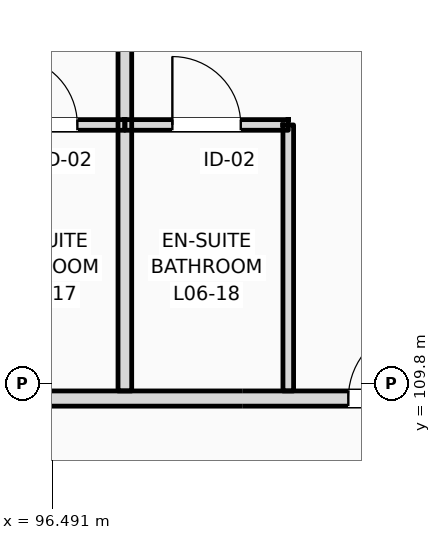
"""IFC4 building model, lengths in metres.
Left out: names, types, materials, properties, quantities, classifications, styles, units other than length and angle.
Written with IfcOpenShell. Run it as: python <this file> out.ifc"""

import sys

from ifc_helpers import new_model, si_unit, direction, frame, frame_2d, origin, place, context, subcontext, project, spatial, rectangle, extrude, element, fill, save


model = new_model("IFC4")
c1 = context("Model", 3, precision=1e-05, world=origin(), true_north=direction((0.0, 1.0)))
c2 = subcontext(c1, "Body", "Model", "MODEL_VIEW")
j1 = project(units=[si_unit("LENGTHUNIT", "METRE"), si_unit("PLANEANGLEUNIT", "RADIAN")], contexts=[c1])
p1 = place(None, origin())
s1 = spatial("IfcSite", under=j1, at=p1, CompositionType="ELEMENT")
p2 = place(p1, origin())
s2 = spatial("IfcBuilding", under=s1, at=p2, CompositionType="ELEMENT")
p3 = place(p2, frame((0.0, 0.0, 28.2)))
s3 = spatial("IfcBuildingStorey", under=s2, at=p3, CompositionType="ELEMENT", Elevation=28.2)
p4 = place(p3, frame((10.65, 109.6, 0.0), z_axis=(0.0, 0.0, 1.0), x_axis=(1.0, 0.0, 0.0)))
e1 = element("IfcWall", 1, at=p4, inside=s3, PredefinedType="PARTITIONING", context=c2, shape_type="SweptSolid", body=[
    extrude(rectangle(XDim=109.21, YDim=0.2, at=frame_2d((54.605, 0.0))), origin(), (0.0, 0.0, 1.0), 2.8),
])
p5 = place(p4, frame((12.611, 0.0, 0.0)))
e2 = element("IfcOpeningElement", 2, at=p5, cuts=e1, PredefinedType="OPENING", context=c2, shape_type="SweptSolid", body=[
    extrude(rectangle(XDim=1.02, YDim=2.2, at=frame_2d((0.51, 1.1))), frame((0.0, 0.11, 0.0), z_axis=(0.0, -1.0, 0.0), x_axis=(1.0, 0.0, 0.0)), (0.0, 0.0, 1.0), 0.22),
])
p6 = place(p4, frame((19.451, 0.0, 0.0)))
e3 = element("IfcOpeningElement", 3, at=p6, cuts=e1, PredefinedType="OPENING", context=c2, shape_type="SweptSolid", body=[
    extrude(rectangle(XDim=1.02, YDim=2.2, at=frame_2d((0.51, 1.1))), frame((0.0, 0.11, 0.0), z_axis=(0.0, -1.0, 0.0), x_axis=(1.0, 0.0, 0.0)), (0.0, 0.0, 1.0), 0.22),
])
p7 = place(p4, frame((23.842, 0.0, 0.0)))
e4 = element("IfcOpeningElement", 4, at=p7, cuts=e1, PredefinedType="OPENING", context=c2, shape_type="SweptSolid", body=[
    extrude(rectangle(XDim=1.02, YDim=2.2, at=frame_2d((0.51, 1.1))), frame((0.0, 0.11, 0.0), z_axis=(0.0, -1.0, 0.0), x_axis=(1.0, 0.0, 0.0)), (0.0, 0.0, 1.0), 0.22),
])
p8 = place(p4, frame((26.084, 0.0, 0.0)))
e5 = element("IfcOpeningElement", 5, at=p8, cuts=e1, PredefinedType="OPENING", context=c2, shape_type="SweptSolid", body=[
    extrude(rectangle(XDim=1.02, YDim=2.2, at=frame_2d((0.51, 1.1))), frame((0.0, 0.11, 0.0), z_axis=(0.0, -1.0, 0.0), x_axis=(1.0, 0.0, 0.0)), (0.0, 0.0, 1.0), 0.22),
])
p9 = place(p4, frame((32.655, 0.0, 0.0)))
e6 = element("IfcOpeningElement", 6, at=p9, cuts=e1, PredefinedType="OPENING", context=c2, shape_type="SweptSolid", body=[
    extrude(rectangle(XDim=0.96, YDim=2.2, at=frame_2d((0.48, 1.1))), frame((0.0, 0.11, 0.0), z_axis=(0.0, -1.0, 0.0), x_axis=(1.0, 0.0, 0.0)), (0.0, 0.0, 1.0), 0.22),
])
p10 = place(p4, frame((34.895, 0.0, 0.0)))
e7 = element("IfcOpeningElement", 7, at=p10, cuts=e1, PredefinedType="OPENING", context=c2, shape_type="SweptSolid", body=[
    extrude(rectangle(XDim=0.96, YDim=2.2, at=frame_2d((0.48, 1.1))), frame((0.0, 0.11, 0.0), z_axis=(0.0, -1.0, 0.0), x_axis=(1.0, 0.0, 0.0)), (0.0, 0.0, 1.0), 0.22),
])
p11 = place(p4, frame((41.436, 0.0, 0.0)))
e8 = element("IfcOpeningElement", 8, at=p11, cuts=e1, PredefinedType="OPENING", context=c2, shape_type="SweptSolid", body=[
    extrude(rectangle(XDim=0.96, YDim=2.2, at=frame_2d((0.48, 1.1))), frame((0.0, 0.11, 0.0), z_axis=(0.0, -1.0, 0.0), x_axis=(1.0, 0.0, 0.0)), (0.0, 0.0, 1.0), 0.22),
])
p12 = place(p4, frame((43.427, 0.0, 0.0)))
e9 = element("IfcOpeningElement", 9, at=p12, cuts=e1, PredefinedType="OPENING", context=c2, shape_type="SweptSolid", body=[
    extrude(rectangle(XDim=0.96, YDim=2.2, at=frame_2d((0.48, 1.1))), frame((0.0, 0.11, 0.0), z_axis=(0.0, -1.0, 0.0), x_axis=(1.0, 0.0, 0.0)), (0.0, 0.0, 1.0), 0.22),
])
p13 = place(p4, frame((50.218, 0.0, 0.0)))
e10 = element("IfcOpeningElement", 10, at=p13, cuts=e1, PredefinedType="OPENING", context=c2, shape_type="SweptSolid", body=[
    extrude(rectangle(XDim=0.96, YDim=2.2, at=frame_2d((0.48, 1.1))), frame((0.0, 0.11, 0.0), z_axis=(0.0, -1.0, 0.0), x_axis=(1.0, 0.0, 0.0)), (0.0, 0.0, 1.0), 0.22),
])
p14 = place(p4, frame((54.859, 0.0, 0.0)))
e11 = element("IfcOpeningElement", 11, at=p14, cuts=e1, PredefinedType="OPENING", context=c2, shape_type="SweptSolid", body=[
    extrude(rectangle(XDim=0.96, YDim=2.2, at=frame_2d((0.48, 1.1))), frame((0.0, 0.11, 0.0), z_axis=(0.0, -1.0, 0.0), x_axis=(1.0, 0.0, 0.0)), (0.0, 0.0, 1.0), 0.22),
])
p15 = place(p4, frame((59.0, 0.0, 0.0)))
e12 = element("IfcOpeningElement", 12, at=p15, cuts=e1, PredefinedType="OPENING", context=c2, shape_type="SweptSolid", body=[
    extrude(rectangle(XDim=0.96, YDim=2.2, at=frame_2d((0.48, 1.1))), frame((0.0, 0.11, 0.0), z_axis=(0.0, -1.0, 0.0), x_axis=(1.0, 0.0, 0.0)), (0.0, 0.0, 1.0), 0.22),
])
p16 = place(p4, frame((63.39, 0.0, 0.0)))
e13 = element("IfcOpeningElement", 13, at=p16, cuts=e1, PredefinedType="OPENING", context=c2, shape_type="SweptSolid", body=[
    extrude(rectangle(XDim=0.96, YDim=2.2, at=frame_2d((0.48, 1.1))), frame((0.0, 0.11, 0.0), z_axis=(0.0, -1.0, 0.0), x_axis=(1.0, 0.0, 0.0)), (0.0, 0.0, 1.0), 0.22),
])
p17 = place(p4, frame((65.631, 0.0, 0.0)))
e14 = element("IfcOpeningElement", 14, at=p17, cuts=e1, PredefinedType="OPENING", context=c2, shape_type="SweptSolid", body=[
    extrude(rectangle(XDim=0.96, YDim=2.2, at=frame_2d((0.48, 1.1))), frame((0.0, 0.11, 0.0), z_axis=(0.0, -1.0, 0.0), x_axis=(1.0, 0.0, 0.0)), (0.0, 0.0, 1.0), 0.22),
])
p18 = place(p4, frame((72.172, 0.0, 0.0)))
e15 = element("IfcOpeningElement", 15, at=p18, cuts=e1, PredefinedType="OPENING", context=c2, shape_type="SweptSolid", body=[
    extrude(rectangle(XDim=0.96, YDim=2.2, at=frame_2d((0.48, 1.1))), frame((0.0, 0.11, 0.0), z_axis=(0.0, -1.0, 0.0), x_axis=(1.0, 0.0, 0.0)), (0.0, 0.0, 1.0), 0.22),
])
p19 = place(p4, frame((74.413, 0.0, 0.0)))
e16 = element("IfcOpeningElement", 16, at=p19, cuts=e1, PredefinedType="OPENING", context=c2, shape_type="SweptSolid", body=[
    extrude(rectangle(XDim=0.96, YDim=2.2, at=frame_2d((0.48, 1.1))), frame((0.0, 0.11, 0.0), z_axis=(0.0, -1.0, 0.0), x_axis=(1.0, 0.0, 0.0)), (0.0, 0.0, 1.0), 0.22),
])
p20 = place(p4, frame((80.954, 0.0, 0.0)))
e17 = element("IfcOpeningElement", 17, at=p20, cuts=e1, PredefinedType="OPENING", context=c2, shape_type="SweptSolid", body=[
    extrude(rectangle(XDim=0.96, YDim=2.2, at=frame_2d((0.48, 1.1))), frame((0.0, 0.11, 0.0), z_axis=(0.0, -1.0, 0.0), x_axis=(1.0, 0.0, 0.0)), (0.0, 0.0, 1.0), 0.22),
])
p21 = place(p4, frame((83.195, 0.0, 0.0)))
e18 = element("IfcOpeningElement", 18, at=p21, cuts=e1, PredefinedType="OPENING", context=c2, shape_type="SweptSolid", body=[
    extrude(rectangle(XDim=0.96, YDim=2.2, at=frame_2d((0.48, 1.1))), frame((0.0, 0.11, 0.0), z_axis=(0.0, -1.0, 0.0), x_axis=(1.0, 0.0, 0.0)), (0.0, 0.0, 1.0), 0.22),
])
p22 = place(p4, frame((89.735, 0.0, 0.0)))
e19 = element("IfcOpeningElement", 19, at=p22, cuts=e1, PredefinedType="OPENING", context=c2, shape_type="SweptSolid", body=[
    extrude(rectangle(XDim=0.96, YDim=2.2, at=frame_2d((0.48, 1.1))), frame((0.0, 0.11, 0.0), z_axis=(0.0, -1.0, 0.0), x_axis=(1.0, 0.0, 0.0)), (0.0, 0.0, 1.0), 0.22),
])
p23 = place(p4, frame((94.126, 0.0, 0.0)))
e20 = element("IfcOpeningElement", 20, at=p23, cuts=e1, PredefinedType="OPENING", context=c2, shape_type="SweptSolid", body=[
    extrude(rectangle(XDim=0.96, YDim=2.2, at=frame_2d((0.48, 1.1))), frame((0.0, 0.11, 0.0), z_axis=(0.0, -1.0, 0.0), x_axis=(1.0, 0.0, 0.0)), (0.0, 0.0, 1.0), 0.22),
])
p24 = place(p4, frame((98.517, 0.0, 0.0)))
e21 = element("IfcOpeningElement", 21, at=p24, cuts=e1, PredefinedType="OPENING", context=c2, shape_type="SweptSolid", body=[
    extrude(rectangle(XDim=0.96, YDim=2.2, at=frame_2d((0.48, 1.1))), frame((0.0, 0.11, 0.0), z_axis=(0.0, -1.0, 0.0), x_axis=(1.0, 0.0, 0.0)), (0.0, 0.0, 1.0), 0.22),
])
p25 = place(p4, frame((102.908, 0.0, 0.0)))
e22 = element("IfcOpeningElement", 22, at=p25, cuts=e1, PredefinedType="OPENING", context=c2, shape_type="SweptSolid", body=[
    extrude(rectangle(XDim=0.96, YDim=2.2, at=frame_2d((0.48, 1.1))), frame((0.0, 0.11, 0.0), z_axis=(0.0, -1.0, 0.0), x_axis=(1.0, 0.0, 0.0)), (0.0, 0.0, 1.0), 0.22),
])
p26 = place(p4, frame((105.099, 0.0, 0.0)))
e23 = element("IfcOpeningElement", 23, at=p26, cuts=e1, PredefinedType="OPENING", context=c2, shape_type="SweptSolid", body=[
    extrude(rectangle(XDim=0.96, YDim=2.2, at=frame_2d((0.48, 1.1))), frame((0.0, 0.11, 0.0), z_axis=(0.0, -1.0, 0.0), x_axis=(1.0, 0.0, 0.0)), (0.0, 0.0, 1.0), 0.22),
])
p27 = place(p4, frame((2.716, 0.0, 0.0)))
e24 = element("IfcOpeningElement", 24, at=p27, cuts=e1, PredefinedType="OPENING", context=c2, shape_type="SweptSolid", body=[
    extrude(rectangle(XDim=1.35, YDim=2.25, at=frame_2d((0.675, 1.125))), frame((0.0, 0.11, 0.0), z_axis=(0.0, -1.0, 0.0), x_axis=(1.0, 0.0, 0.0)), (0.0, 0.0, 1.0), 0.22),
])
p28 = place(p4, frame((6.65, 0.0, 0.0)))
e25 = element("IfcOpeningElement", 25, at=p28, cuts=e1, PredefinedType="OPENING", context=c2, shape_type="SweptSolid", body=[
    extrude(rectangle(XDim=1.35, YDim=2.25, at=frame_2d((0.675, 1.125))), frame((0.0, 0.11, 0.0), z_axis=(0.0, -1.0, 0.0), x_axis=(1.0, 0.0, 0.0)), (0.0, 0.0, 1.0), 0.22),
])
p29 = place(p4, frame((10.583, 0.0, 0.0)))
e26 = element("IfcOpeningElement", 26, at=p29, cuts=e1, PredefinedType="OPENING", context=c2, shape_type="SweptSolid", body=[
    extrude(rectangle(XDim=1.35, YDim=2.25, at=frame_2d((0.675, 1.125))), frame((0.0, 0.11, 0.0), z_axis=(0.0, -1.0, 0.0), x_axis=(1.0, 0.0, 0.0)), (0.0, 0.0, 1.0), 0.22),
])
p30 = place(p3, frame((97.445, 109.7, 0.0), z_axis=(0.0, 0.0, 1.0), x_axis=(0.0, 1.0, 0.0)))
e27 = element("IfcWall", 27, at=p30, inside=s3, PredefinedType="PARTITIONING", context=c2, shape_type="SweptSolid", body=[
    extrude(rectangle(XDim=8.15, YDim=0.18, at=frame_2d((4.075, 0.0))), origin(), (0.0, 0.0, 1.0), 3.36),
])
p31 = place(p3, frame((95.295, 113.2, 0.0), z_axis=(0.0, 0.0, 1.0), x_axis=(1.0, 0.0, 0.0)))
e28 = element("IfcWall", 28, at=p31, inside=s3, PredefinedType="PARTITIONING", context=c2, shape_type="SweptSolid", body=[
    extrude(rectangle(XDim=2.15, YDim=0.14, at=frame_2d((1.075, 0.0))), origin(), (0.0, 0.0, 1.0), 3.36),
])
p32 = place(p31, frame((0.625, 0.0, 0.0)))
e29 = element("IfcOpeningElement", 29, at=p32, cuts=e28, PredefinedType="OPENING", context=c2, shape_type="SweptSolid", body=[
    extrude(rectangle(XDim=0.9, YDim=2.1, at=frame_2d((0.45, 1.05))), frame((0.0, 0.08, 0.0), z_axis=(0.0, -1.0, 0.0), x_axis=(1.0, 0.0, 0.0)), (0.0, 0.0, 1.0), 0.16),
])
p33 = place(p3, frame((99.595, 109.7, 0.0), z_axis=(0.0, 0.0, 1.0), x_axis=(0.0, 1.0, 0.0)))
e30 = element("IfcWall", 30, at=p33, inside=s3, PredefinedType="PARTITIONING", context=c2, shape_type="SweptSolid", body=[
    extrude(rectangle(XDim=3.5, YDim=0.14, at=frame_2d((1.75, 0.0))), origin(), (0.0, 0.0, 1.0), 3.36),
])
p34 = place(p3, frame((97.445, 113.2, 0.0), z_axis=(0.0, 0.0, 1.0), x_axis=(1.0, 0.0, 0.0)))
e31 = element("IfcWall", 31, at=p34, inside=s3, PredefinedType="PARTITIONING", context=c2, shape_type="SweptSolid", body=[
    extrude(rectangle(XDim=2.15, YDim=0.14, at=frame_2d((1.075, 0.0))), origin(), (0.0, 0.0, 1.0), 3.36),
])
p35 = place(p34, frame((0.625, 0.0, 0.0)))
e32 = element("IfcOpeningElement", 32, at=p35, cuts=e31, PredefinedType="OPENING", context=c2, shape_type="SweptSolid", body=[
    extrude(rectangle(XDim=0.9, YDim=2.1, at=frame_2d((0.45, 1.05))), frame((0.0, 0.08, 0.0), z_axis=(0.0, -1.0, 0.0), x_axis=(1.0, 0.0, 0.0)), (0.0, 0.0, 1.0), 0.16),
])
p36 = place(p32, origin())
e33 = element("IfcDoor", 33, at=p36, inside=s3, OperationType="SINGLE_SWING_LEFT", PredefinedType="DOOR", context=c2, shape_type="SweptSolid", body=[
    extrude(rectangle(XDim=0.9, YDim=2.1, at=frame_2d((0.45, 1.05))), frame((0.0, 0.025, 0.0), z_axis=(0.0, -1.0, 0.0), x_axis=(1.0, 0.0, 0.0)), (0.0, 0.0, 1.0), 0.05),
])
fill(e29, e33)
p37 = place(p22, origin())
e34 = element("IfcDoor", 34, at=p37, inside=s3, OperationType="SINGLE_SWING_RIGHT", PredefinedType="DOOR", context=c2, shape_type="SweptSolid", body=[
    extrude(rectangle(XDim=0.96, YDim=2.2, at=frame_2d((0.48, 1.1))), frame((0.0, 0.025, 0.0), z_axis=(0.0, -1.0, 0.0), x_axis=(1.0, 0.0, 0.0)), (0.0, 0.0, 1.0), 0.05),
])
fill(e19, e34)
p38 = place(p35, origin())
e35 = element("IfcDoor", 35, at=p38, inside=s3, OperationType="SINGLE_SWING_LEFT", PredefinedType="DOOR", context=c2, shape_type="SweptSolid", body=[
    extrude(rectangle(XDim=0.9, YDim=2.1, at=frame_2d((0.45, 1.05))), frame((0.0, 0.025, 0.0), z_axis=(0.0, -1.0, 0.0), x_axis=(1.0, 0.0, 0.0)), (0.0, 0.0, 1.0), 0.05),
])
fill(e32, e35)
save(model, sys.argv[1])
